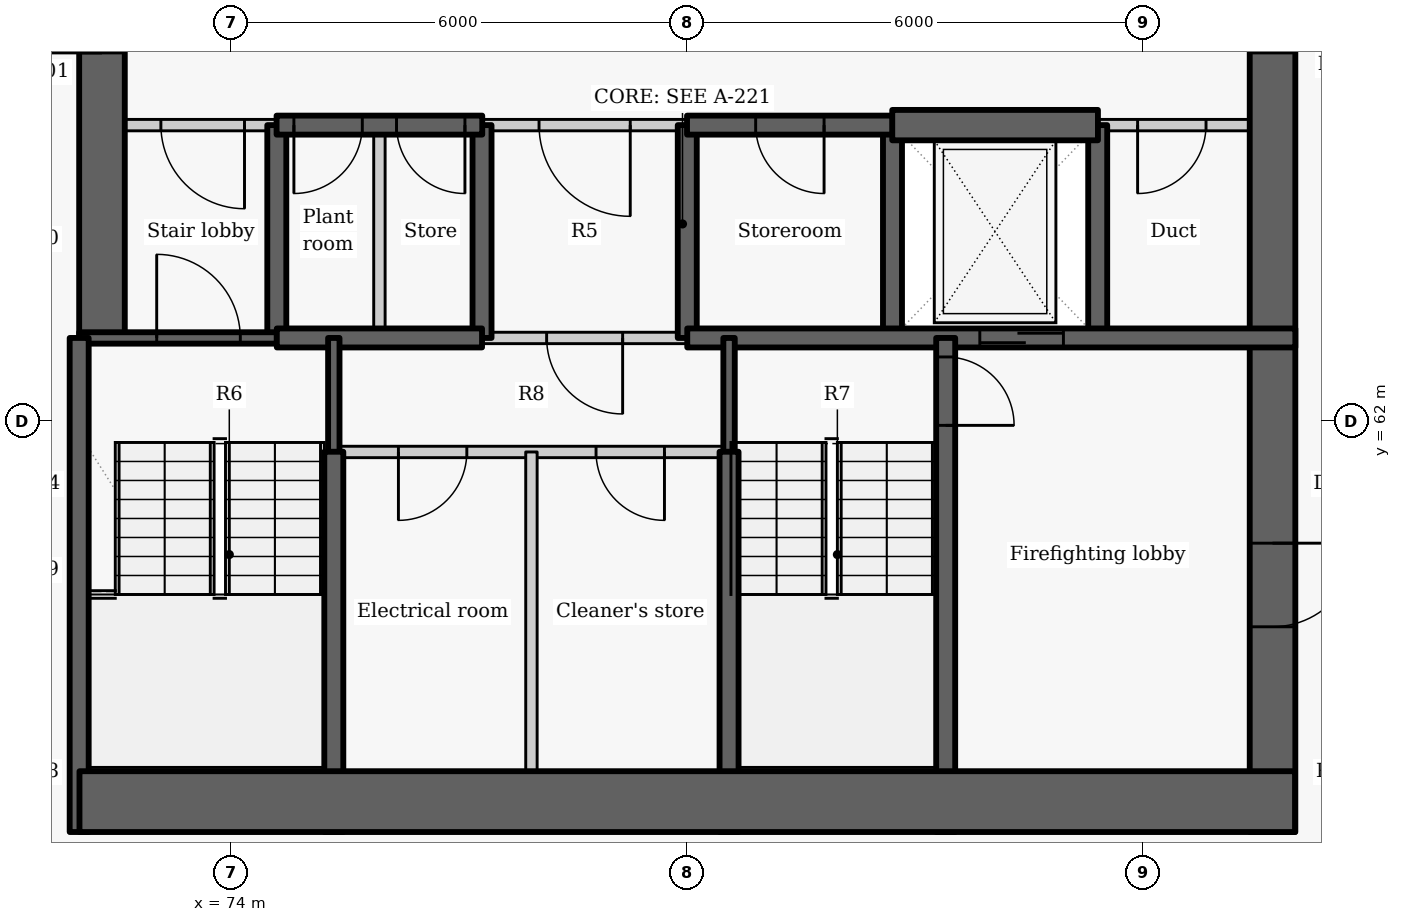
"""IFC4 building model, lengths in metres.
Left out: names, types, materials, properties, quantities, classifications, styles, units other than length and angle.
Written with IfcOpenShell. Run it as: python <this file> out.ifc"""

import sys

from ifc_helpers import new_model, si_unit, direction, frame, frame_2d, origin, place, context, subcontext, project, spatial, rectangle, extrude, element, fill, save


model = new_model("IFC4")
c1 = context("Model", 3, precision=1e-05, world=origin(), true_north=direction((0.0, 1.0)))
c2 = subcontext(c1, "Body", "Model", "MODEL_VIEW")
j1 = project(units=[si_unit("LENGTHUNIT", "METRE"), si_unit("PLANEANGLEUNIT", "RADIAN")], contexts=[c1])
p1 = place(None, origin())
s1 = spatial("IfcSite", under=j1, at=p1, CompositionType="ELEMENT")
p2 = place(p1, origin())
s2 = spatial("IfcBuilding", under=s1, at=p2, CompositionType="ELEMENT")
p3 = place(p2, frame((0.0, 0.0, 114.0)))
s3 = spatial("IfcBuildingStorey", under=s2, at=p3, CompositionType="ELEMENT", Elevation=114.0)
p4 = place(p3, frame((74.6, 63.1, -0.275), z_axis=(0.0, 0.0, 1.0), x_axis=(0.0, 1.0, 0.0)))
e1 = element("IfcWall", 1, at=p4, inside=s3, PredefinedType="SHEAR", context=c2, shape_type="SweptSolid", body=[
    extrude(rectangle(XDim=2.8, YDim=0.25, at=frame_2d((1.4, 0.0))), origin(), (0.0, 0.0, 1.0), 3.3),
])
p5 = place(p3, frame((72.3, 63.1, -0.275), z_axis=(0.0, 0.0, 1.0), x_axis=(0.0, 1.0, 0.0)))
e2 = element("IfcWall", 2, at=p5, inside=s3, PredefinedType="SHEAR", context=c2, shape_type="SweptSolid", body=[
    extrude(rectangle(XDim=9.1, YDim=0.6, at=frame_2d((4.55, 0.0))), origin(), (0.0, 0.0, 1.0), 3.3),
])
p6 = place(p5, frame((3.75, 0.0, 0.275)))
e3 = element("IfcOpeningElement", 3, at=p6, cuts=e2, PredefinedType="OPENING", context=c2, shape_type="SweptSolid", body=[
    extrude(rectangle(XDim=1.5, YDim=2.1, at=frame_2d((0.75, 1.05))), frame((0.0, 0.31, 0.0), z_axis=(0.0, -1.0, 0.0), x_axis=(1.0, 0.0, 0.0)), (0.0, 0.0, 1.0), 0.62),
])
for number, where, z_axis, x_axis in (
    (4, (77.3, 63.1, -0.275), (0.0, 0.0, 1.0), (0.0, 1.0, 0.0)),
    (5, (80.0, 63.1, -0.275), (0.0, 0.0, 1.0), (0.0, 1.0, 0.0)),
    (6, (82.7, 63.1, -0.275), (0.0, 0.0, 1.0), (0.0, 1.0, 0.0)),
    (7, (85.4, 63.1, -0.275), (0.0, 0.0, 1.0), (0.0, 1.0, 0.0)),
):
    element("IfcWall", number, at=place(p3, frame(where, z_axis=z_axis, x_axis=x_axis)), inside=s3, PredefinedType="SHEAR", context=c2, shape_type="SweptSolid", body=[
        extrude(rectangle(XDim=2.8, YDim=0.25, at=frame_2d((1.4, 0.0))), origin(), (0.0, 0.0, 1.0), 3.3),
    ])
p7 = place(p3, frame((87.7, 72.2, -0.275), z_axis=(0.0, 0.0, 1.0), x_axis=(0.0, -1.0, 0.0)))
e8 = element("IfcWall", 8, at=p7, inside=s3, PredefinedType="SHEAR", context=c2, shape_type="SweptSolid", body=[
    extrude(rectangle(XDim=15.6, YDim=0.6, at=frame_2d((7.8, 0.0))), origin(), (0.0, 0.0, 1.0), 3.3),
])
p8 = place(p7, frame((3.85, 0.0, 0.275)))
e9 = element("IfcOpeningElement", 9, at=p8, cuts=e8, PredefinedType="OPENING", context=c2, shape_type="SweptSolid", body=[
    extrude(rectangle(XDim=1.5, YDim=2.1, at=frame_2d((0.75, 1.05))), frame((0.0, 0.31, 0.0), z_axis=(0.0, -1.0, 0.0), x_axis=(1.0, 0.0, 0.0)), (0.0, 0.0, 1.0), 0.62),
])
p9 = place(p7, frame((11.8, 0.0, 0.275)))
e10 = element("IfcOpeningElement", 10, at=p9, cuts=e8, PredefinedType="OPENING", context=c2, shape_type="SweptSolid", body=[
    extrude(rectangle(XDim=1.1, YDim=2.1, at=frame_2d((0.55, 1.05))), frame((0.0, 0.31, 0.0), z_axis=(0.0, -1.0, 0.0), x_axis=(1.0, 0.0, 0.0)), (0.0, 0.0, 1.0), 0.62),
])
p10 = place(p3, frame((74.603, 65.9, 0.0), z_axis=(0.0, 0.0, 1.0), x_axis=(-1.0, 0.0, 0.0)))
e11 = element("IfcWall", 11, at=p10, inside=s3, PredefinedType="PARTITIONING", context=c2, shape_type="SweptSolid", body=[
    extrude(rectangle(XDim=2.603, YDim=0.15, at=frame_2d((1.302, 0.0))), origin(), (0.0, 0.0, 1.0), 3.025),
])
p11 = place(p10, frame((0.428, 0.0, 0.0)))
e12 = element("IfcOpeningElement", 12, at=p11, cuts=e11, PredefinedType="OPENING", context=c2, shape_type="SweptSolid", body=[
    extrude(rectangle(XDim=1.1, YDim=2.1, at=frame_2d((0.55, 1.05))), frame((0.0, 0.085, 0.0), z_axis=(0.0, -1.0, 0.0), x_axis=(1.0, 0.0, 0.0)), (0.0, 0.0, 1.0), 0.17),
])
p12 = place(p3, frame((80.003, 65.9, 0.0), z_axis=(0.0, 0.0, 1.0), x_axis=(-1.0, 0.0, 0.0)))
e13 = element("IfcWall", 13, at=p12, inside=s3, PredefinedType="PARTITIONING", context=c2, shape_type="SweptSolid", body=[
    extrude(rectangle(XDim=2.706, YDim=0.15, at=frame_2d((1.353, 0.0))), origin(), (0.0, 0.0, 1.0), 3.025),
])
p13 = place(p12, frame((0.753, 0.0, 0.0)))
e14 = element("IfcOpeningElement", 14, at=p13, cuts=e13, PredefinedType="OPENING", context=c2, shape_type="SweptSolid", body=[
    extrude(rectangle(XDim=1.2, YDim=2.1, at=frame_2d((0.6, 1.05))), frame((0.0, 0.085, 0.0), z_axis=(0.0, -1.0, 0.0), x_axis=(1.0, 0.0, 0.0)), (0.0, 0.0, 1.0), 0.17),
])
p14 = place(p3, frame((88.0, 65.9, 0.0), z_axis=(0.0, 0.0, 1.0), x_axis=(-1.0, 0.0, 0.0)))
e15 = element("IfcWall", 15, at=p14, inside=s3, PredefinedType="PARTITIONING", context=c2, shape_type="SweptSolid", body=[
    extrude(rectangle(XDim=2.603, YDim=0.15, at=frame_2d((1.302, 0.0))), origin(), (0.0, 0.0, 1.0), 3.025),
])
p15 = place(p14, frame((1.175, 0.0, 0.0)))
e16 = element("IfcOpeningElement", 16, at=p15, cuts=e15, PredefinedType="OPENING", context=c2, shape_type="SweptSolid", body=[
    extrude(rectangle(XDim=0.9, YDim=2.1, at=frame_2d((0.45, 1.05))), frame((0.0, 0.085, 0.0), z_axis=(0.0, -1.0, 0.0), x_axis=(1.0, 0.0, 0.0)), (0.0, 0.0, 1.0), 0.17),
])
p16 = place(p3, frame((77.303, 65.9, -0.275), z_axis=(0.0, 0.0, 1.0), x_axis=(-1.0, 0.0, 0.0)))
e17 = element("IfcWall", 17, at=p16, inside=s3, PredefinedType="SHEAR", context=c2, shape_type="SweptSolid", body=[
    extrude(rectangle(XDim=2.706, YDim=0.25, at=frame_2d((1.353, 0.0))), origin(), (0.0, 0.0, 1.0), 3.3),
])
p17 = place(p16, frame((1.578, 0.0, 0.275)))
e18 = element("IfcOpeningElement", 18, at=p17, cuts=e17, PredefinedType="OPENING", context=c2, shape_type="SweptSolid", body=[
    extrude(rectangle(XDim=0.9, YDim=2.1, at=frame_2d((0.45, 1.05))), frame((0.0, 0.135, 0.0), z_axis=(0.0, -1.0, 0.0), x_axis=(1.0, 0.0, 0.0)), (0.0, 0.0, 1.0), 0.27),
])
p18 = place(p16, frame((0.228, 0.0, 0.275)))
e19 = element("IfcOpeningElement", 19, at=p18, cuts=e17, PredefinedType="OPENING", context=c2, shape_type="SweptSolid", body=[
    extrude(rectangle(XDim=0.9, YDim=2.1, at=frame_2d((0.45, 1.05))), frame((0.0, 0.135, 0.0), z_axis=(0.0, -1.0, 0.0), x_axis=(1.0, 0.0, 0.0)), (0.0, 0.0, 1.0), 0.27),
])
p19 = place(p3, frame((82.703, 65.9, -0.275), z_axis=(0.0, 0.0, 1.0), x_axis=(-1.0, 0.0, 0.0)))
e20 = element("IfcWall", 20, at=p19, inside=s3, PredefinedType="SHEAR", context=c2, shape_type="SweptSolid", body=[
    extrude(rectangle(XDim=2.706, YDim=0.25, at=frame_2d((1.353, 0.0))), origin(), (0.0, 0.0, 1.0), 3.3),
])
p20 = place(p19, frame((0.903, 0.0, 0.275)))
e21 = element("IfcOpeningElement", 21, at=p20, cuts=e20, PredefinedType="OPENING", context=c2, shape_type="SweptSolid", body=[
    extrude(rectangle(XDim=0.9, YDim=2.1, at=frame_2d((0.45, 1.05))), frame((0.0, 0.135, 0.0), z_axis=(0.0, -1.0, 0.0), x_axis=(1.0, 0.0, 0.0)), (0.0, 0.0, 1.0), 0.27),
])
p21 = place(p3, frame((82.697, 65.9, -0.275), z_axis=(0.0, 0.0, 1.0), x_axis=(1.0, 0.0, 0.0)))
e22 = element("IfcWall", 22, at=p21, inside=s3, PredefinedType="SHEAR", context=c2, shape_type="SweptSolid", body=[
    extrude(rectangle(XDim=2.706, YDim=0.4, at=frame_2d((1.353, 0.0))), origin(), (0.0, 0.0, 1.0), 3.3),
])
p22 = place(p3, frame((72.0, 63.1, -0.275), z_axis=(0.0, 0.0, 1.0), x_axis=(1.0, 0.0, 0.0)))
e23 = element("IfcWall", 23, at=p22, inside=s3, PredefinedType="SHEAR", context=c2, shape_type="SweptSolid", body=[
    extrude(rectangle(XDim=2.6, YDim=0.15, at=frame_2d((1.3, 0.0))), origin(), (0.0, 0.0, 1.0), 3.3),
])
p23 = place(p22, frame((1.02, 0.0, 0.275)))
e24 = element("IfcOpeningElement", 24, at=p23, cuts=e23, PredefinedType="OPENING", context=c2, shape_type="SweptSolid", body=[
    extrude(rectangle(XDim=1.1, YDim=2.1, at=frame_2d((0.55, 1.05))), frame((0.0, 0.085, 0.0), z_axis=(0.0, -1.0, 0.0), x_axis=(1.0, 0.0, 0.0)), (0.0, 0.0, 1.0), 0.17),
])
p24 = place(p3, frame((75.95, 63.1, 0.0), z_axis=(0.0, 0.0, 1.0), x_axis=(0.0, 1.0, 0.0)))
e25 = element("IfcWall", 25, at=p24, inside=s3, PredefinedType="PARTITIONING", context=c2, shape_type="SweptSolid", body=[
    extrude(rectangle(XDim=2.8, YDim=0.15, at=frame_2d((1.4, 0.0))), origin(), (0.0, 0.0, 1.0), 3.025),
])
p25 = place(p3, frame((74.6, 63.1, -0.275), z_axis=(0.0, 0.0, 1.0), x_axis=(1.0, 0.0, 0.0)))
e26 = element("IfcWall", 26, at=p25, inside=s3, PredefinedType="SHEAR", context=c2, shape_type="SweptSolid", body=[
    extrude(rectangle(XDim=2.7, YDim=0.25, at=frame_2d((1.35, 0.0))), origin(), (0.0, 0.0, 1.0), 3.3),
])
p26 = place(p3, frame((80.0, 63.1, -0.275), z_axis=(0.0, 0.0, 1.0), x_axis=(1.0, 0.0, 0.0)))
e27 = element("IfcWall", 27, at=p26, inside=s3, PredefinedType="SHEAR", context=c2, shape_type="SweptSolid", body=[
    extrude(rectangle(XDim=8.0, YDim=0.25, at=frame_2d((4.0, 0.0))), origin(), (0.0, 0.0, 1.0), 3.3),
])
p27 = place(p26, frame((3.849, 0.0, 0.275)))
e28 = element("IfcOpeningElement", 28, at=p27, cuts=e27, PredefinedType="OPENING", context=c2, shape_type="SweptSolid", body=[
    extrude(rectangle(XDim=1.1, YDim=2.1, at=frame_2d((0.55, 1.05))), frame((0.0, 0.135, 0.0), z_axis=(0.0, -1.0, 0.0), x_axis=(1.0, 0.0, 0.0)), (0.0, 0.0, 1.0), 0.27),
])
p28 = place(p3, frame((80.0, 63.1, 0.0), z_axis=(0.0, 0.0, 1.0), x_axis=(-1.0, 0.0, 0.0)))
e29 = element("IfcWall", 29, at=p28, inside=s3, PredefinedType="PARTITIONING", context=c2, shape_type="SweptSolid", body=[
    extrude(rectangle(XDim=2.7, YDim=0.15, at=frame_2d((1.35, 0.0))), origin(), (0.0, 0.0, 1.0), 3.025),
])
p29 = place(p28, frame((0.85, 0.0, 0.0)))
e30 = element("IfcOpeningElement", 30, at=p29, cuts=e29, PredefinedType="OPENING", context=c2, shape_type="SweptSolid", body=[
    extrude(rectangle(XDim=1.0, YDim=2.1, at=frame_2d((0.5, 1.05))), frame((0.0, 0.085, 0.0), z_axis=(0.0, -1.0, 0.0), x_axis=(1.0, 0.0, 0.0)), (0.0, 0.0, 1.0), 0.17),
])
p30 = place(p3, frame((75.35, 61.597, -0.275), z_axis=(0.0, 0.0, 1.0), x_axis=(0.0, 1.0, 0.0)))
e31 = element("IfcWall", 31, at=p30, inside=s3, PredefinedType="SHEAR", context=c2, shape_type="SweptSolid", body=[
    extrude(rectangle(XDim=1.503, YDim=0.15, at=frame_2d((0.751, 0.0))), origin(), (0.0, 0.0, 1.0), 3.3),
])
p31 = place(p3, frame((75.35, 56.6, -0.275), z_axis=(0.0, 0.0, 1.0), x_axis=(0.0, 1.0, 0.0)))
e32 = element("IfcWall", 32, at=p31, inside=s3, PredefinedType="SHEAR", context=c2, shape_type="SweptSolid", body=[
    extrude(rectangle(XDim=5.003, YDim=0.25, at=frame_2d((2.501, 0.0))), origin(), (0.0, 0.0, 1.0), 3.3),
])
p32 = place(p3, frame((72.0, 56.6, -0.275), z_axis=(0.0, 0.0, 1.0), x_axis=(0.0, 1.0, 0.0)))
e33 = element("IfcWall", 33, at=p32, inside=s3, PredefinedType="SHEAR", context=c2, shape_type="SweptSolid", body=[
    extrude(rectangle(XDim=6.5, YDim=0.25, at=frame_2d((3.25, 0.0))), origin(), (0.0, 0.0, 1.0), 3.3),
])
p33 = place(p3, frame((83.4, 63.1, -0.275), z_axis=(0.0, 0.0, 1.0), x_axis=(0.0, -1.0, 0.0)))
e34 = element("IfcWall", 34, at=p33, inside=s3, PredefinedType="SHEAR", context=c2, shape_type="SweptSolid", body=[
    extrude(rectangle(XDim=6.5, YDim=0.25, at=frame_2d((3.25, 0.0))), origin(), (0.0, 0.0, 1.0), 3.3),
])
p34 = place(p33, frame((0.25, 0.0, 0.275)))
e35 = element("IfcOpeningElement", 35, at=p34, cuts=e34, PredefinedType="OPENING", context=c2, shape_type="SweptSolid", body=[
    extrude(rectangle(XDim=0.9, YDim=2.1, at=frame_2d((0.45, 1.05))), frame((0.0, 0.135, 0.0), z_axis=(0.0, -1.0, 0.0), x_axis=(1.0, 0.0, 0.0)), (0.0, 0.0, 1.0), 0.27),
])
p35 = place(p3, frame((80.55, 61.597, -0.275), z_axis=(0.0, 0.0, 1.0), x_axis=(0.0, 1.0, 0.0)))
e36 = element("IfcWall", 36, at=p35, inside=s3, PredefinedType="SHEAR", context=c2, shape_type="SweptSolid", body=[
    extrude(rectangle(XDim=1.503, YDim=0.15, at=frame_2d((0.751, 0.0))), origin(), (0.0, 0.0, 1.0), 3.3),
])
p36 = place(p3, frame((80.55, 56.6, -0.275), z_axis=(0.0, 0.0, 1.0), x_axis=(0.0, 1.0, 0.0)))
e37 = element("IfcWall", 37, at=p36, inside=s3, PredefinedType="SHEAR", context=c2, shape_type="SweptSolid", body=[
    extrude(rectangle(XDim=5.003, YDim=0.25, at=frame_2d((2.501, 0.0))), origin(), (0.0, 0.0, 1.0), 3.3),
])
p37 = place(p3, frame((80.55, 61.6, 0.0), z_axis=(0.0, 0.0, 1.0), x_axis=(-1.0, 0.0, 0.0)))
e38 = element("IfcWall", 38, at=p37, inside=s3, PredefinedType="PARTITIONING", context=c2, shape_type="SweptSolid", body=[
    extrude(rectangle(XDim=5.2, YDim=0.15, at=frame_2d((2.6, 0.0))), origin(), (0.0, 0.0, 1.0), 3.025),
])
p38 = place(p37, frame((3.45, 0.0, 0.0)))
e39 = element("IfcOpeningElement", 39, at=p38, cuts=e38, PredefinedType="OPENING", context=c2, shape_type="SweptSolid", body=[
    extrude(rectangle(XDim=0.9, YDim=2.1, at=frame_2d((0.45, 1.05))), frame((0.0, 0.085, 0.0), z_axis=(0.0, -1.0, 0.0), x_axis=(1.0, 0.0, 0.0)), (0.0, 0.0, 1.0), 0.17),
])
p39 = place(p37, frame((0.85, 0.0, 0.0)))
e40 = element("IfcOpeningElement", 40, at=p39, cuts=e38, PredefinedType="OPENING", context=c2, shape_type="SweptSolid", body=[
    extrude(rectangle(XDim=0.9, YDim=2.1, at=frame_2d((0.45, 1.05))), frame((0.0, 0.085, 0.0), z_axis=(0.0, -1.0, 0.0), x_axis=(1.0, 0.0, 0.0)), (0.0, 0.0, 1.0), 0.17),
])
p40 = place(p3, frame((77.95, 56.6, 0.0), z_axis=(0.0, 0.0, 1.0), x_axis=(0.0, 1.0, 0.0)))
e41 = element("IfcWall", 41, at=p40, inside=s3, PredefinedType="PARTITIONING", context=c2, shape_type="SweptSolid", body=[
    extrude(rectangle(XDim=5.0, YDim=0.15, at=frame_2d((2.5, 0.0))), origin(), (0.0, 0.0, 1.0), 3.025),
])
p41 = place(p3, frame((72.004, 57.0, -0.275), z_axis=(0.0, 0.0, 1.0), x_axis=(1.0, 0.0, 0.0)))
e42 = element("IfcWall", 42, at=p41, inside=s3, PredefinedType="SHEAR", context=c2, shape_type="SweptSolid", body=[
    extrude(rectangle(XDim=15.992, YDim=0.8, at=frame_2d((7.996, 0.0))), origin(), (0.0, 0.0, 1.0), 3.3),
])
p42 = place(p11, origin())
e43 = element("IfcDoor", 43, at=p42, inside=s3, OperationType="SINGLE_SWING_LEFT", PredefinedType="DOOR", context=c2, shape_type="SweptSolid", body=[
    extrude(rectangle(XDim=1.1, YDim=2.1, at=frame_2d((0.55, 1.05))), frame((0.0, 0.025, 0.0), z_axis=(0.0, -1.0, 0.0), x_axis=(1.0, 0.0, 0.0)), (0.0, 0.0, 1.0), 0.05),
])
fill(e12, e43)
p43 = place(p17, origin())
e44 = element("IfcDoor", 44, at=p43, inside=s3, OperationType="SINGLE_SWING_RIGHT", PredefinedType="DOOR", context=c2, shape_type="SweptSolid", body=[
    extrude(rectangle(XDim=0.9, YDim=2.1, at=frame_2d((0.45, 1.05))), frame((0.0, 0.025, 0.0), z_axis=(0.0, -1.0, 0.0), x_axis=(1.0, 0.0, 0.0)), (0.0, 0.0, 1.0), 0.05),
])
fill(e18, e44)
p44 = place(p18, origin())
e45 = element("IfcDoor", 45, at=p44, inside=s3, OperationType="SINGLE_SWING_LEFT", PredefinedType="DOOR", context=c2, shape_type="SweptSolid", body=[
    extrude(rectangle(XDim=0.9, YDim=2.1, at=frame_2d((0.45, 1.05))), frame((0.0, 0.025, 0.0), z_axis=(0.0, -1.0, 0.0), x_axis=(1.0, 0.0, 0.0)), (0.0, 0.0, 1.0), 0.05),
])
fill(e19, e45)
p45 = place(p13, origin())
e46 = element("IfcDoor", 46, at=p45, inside=s3, OperationType="DOUBLE_DOOR_SINGLE_SWING", PredefinedType="DOOR", context=c2, shape_type="SweptSolid", body=[
    extrude(rectangle(XDim=1.2, YDim=2.1, at=frame_2d((0.6, 1.05))), frame((0.0, 0.025, 0.0), z_axis=(0.0, -1.0, 0.0), x_axis=(1.0, 0.0, 0.0)), (0.0, 0.0, 1.0), 0.05),
])
fill(e14, e46)
p46 = place(p20, origin())
e47 = element("IfcDoor", 47, at=p46, inside=s3, OperationType="SINGLE_SWING_LEFT", PredefinedType="DOOR", context=c2, shape_type="SweptSolid", body=[
    extrude(rectangle(XDim=0.9, YDim=2.1, at=frame_2d((0.45, 1.05))), frame((0.0, 0.025, 0.0), z_axis=(0.0, -1.0, 0.0), x_axis=(1.0, 0.0, 0.0)), (0.0, 0.0, 1.0), 0.05),
])
fill(e21, e47)
p47 = place(p27, origin())
e48 = element("IfcDoor", 48, at=p47, inside=s3, OperationType="SLIDING_TO_LEFT", PredefinedType="DOOR", context=c2, shape_type="SweptSolid", body=[
    extrude(rectangle(XDim=1.1, YDim=2.1, at=frame_2d((0.55, 1.05))), frame((0.0, 0.025, 0.0), z_axis=(0.0, -1.0, 0.0), x_axis=(1.0, 0.0, 0.0)), (0.0, 0.0, 1.0), 0.05),
])
fill(e28, e48)
p48 = place(p15, origin())
e49 = element("IfcDoor", 49, at=p48, inside=s3, OperationType="SINGLE_SWING_RIGHT", PredefinedType="DOOR", context=c2, shape_type="SweptSolid", body=[
    extrude(rectangle(XDim=0.9, YDim=2.1, at=frame_2d((0.45, 1.05))), frame((0.0, 0.025, 0.0), z_axis=(0.0, -1.0, 0.0), x_axis=(1.0, 0.0, 0.0)), (0.0, 0.0, 1.0), 0.05),
])
fill(e16, e49)
p49 = place(p29, origin())
e50 = element("IfcDoor", 50, at=p49, inside=s3, OperationType="SINGLE_SWING_LEFT", PredefinedType="DOOR", context=c2, shape_type="SweptSolid", body=[
    extrude(rectangle(XDim=1.0, YDim=2.1, at=frame_2d((0.5, 1.05))), frame((0.0, 0.025, 0.0), z_axis=(0.0, -1.0, 0.0), x_axis=(1.0, 0.0, 0.0)), (0.0, 0.0, 1.0), 0.05),
])
fill(e30, e50)
p50 = place(p38, origin())
e51 = element("IfcDoor", 51, at=p50, inside=s3, OperationType="SINGLE_SWING_RIGHT", PredefinedType="DOOR", context=c2, shape_type="SweptSolid", body=[
    extrude(rectangle(XDim=0.9, YDim=2.1, at=frame_2d((0.45, 1.05))), frame((0.0, 0.025, 0.0), z_axis=(0.0, -1.0, 0.0), x_axis=(1.0, 0.0, 0.0)), (0.0, 0.0, 1.0), 0.05),
])
fill(e39, e51)
p51 = place(p39, origin())
e52 = element("IfcDoor", 52, at=p51, inside=s3, OperationType="SINGLE_SWING_LEFT", PredefinedType="DOOR", context=c2, shape_type="SweptSolid", body=[
    extrude(rectangle(XDim=0.9, YDim=2.1, at=frame_2d((0.45, 1.05))), frame((0.0, 0.025, 0.0), z_axis=(0.0, -1.0, 0.0), x_axis=(1.0, 0.0, 0.0)), (0.0, 0.0, 1.0), 0.05),
])
fill(e40, e52)
p52 = place(p23, origin())
e53 = element("IfcDoor", 53, at=p52, inside=s3, OperationType="SINGLE_SWING_LEFT", PredefinedType="DOOR", context=c2, shape_type="SweptSolid", body=[
    extrude(rectangle(XDim=1.1, YDim=2.1, at=frame_2d((0.55, 1.05))), frame((0.0, 0.025, 0.0), z_axis=(0.0, -1.0, 0.0), x_axis=(1.0, 0.0, 0.0)), (0.0, 0.0, 1.0), 0.05),
])
fill(e24, e53)
p53 = place(p34, origin())
e54 = element("IfcDoor", 54, at=p53, inside=s3, OperationType="SINGLE_SWING_RIGHT", PredefinedType="DOOR", context=c2, shape_type="SweptSolid", body=[
    extrude(rectangle(XDim=0.9, YDim=2.1, at=frame_2d((0.45, 1.05))), frame((0.0, 0.025, 0.0), z_axis=(0.0, -1.0, 0.0), x_axis=(1.0, 0.0, 0.0)), (0.0, 0.0, 1.0), 0.05),
])
fill(e35, e54)
p54 = place(p8, origin())
e55 = element("IfcDoor", 55, at=p54, inside=s3, OperationType="DOUBLE_DOOR_SINGLE_SWING", PredefinedType="DOOR", context=c2, shape_type="SweptSolid", body=[
    extrude(rectangle(XDim=1.5, YDim=2.1, at=frame_2d((0.75, 1.05))), frame((0.0, 0.025, 0.0), z_axis=(0.0, -1.0, 0.0), x_axis=(1.0, 0.0, 0.0)), (0.0, 0.0, 1.0), 0.05),
])
fill(e9, e55)
p55 = place(p9, origin())
e56 = element("IfcDoor", 56, at=p55, inside=s3, OperationType="SINGLE_SWING_LEFT", PredefinedType="DOOR", context=c2, shape_type="SweptSolid", body=[
    extrude(rectangle(XDim=1.1, YDim=2.1, at=frame_2d((0.55, 1.05))), frame((0.0, 0.025, 0.0), z_axis=(0.0, -1.0, 0.0), x_axis=(1.0, 0.0, 0.0)), (0.0, 0.0, 1.0), 0.05),
])
fill(e10, e56)
save(model, sys.argv[1])
